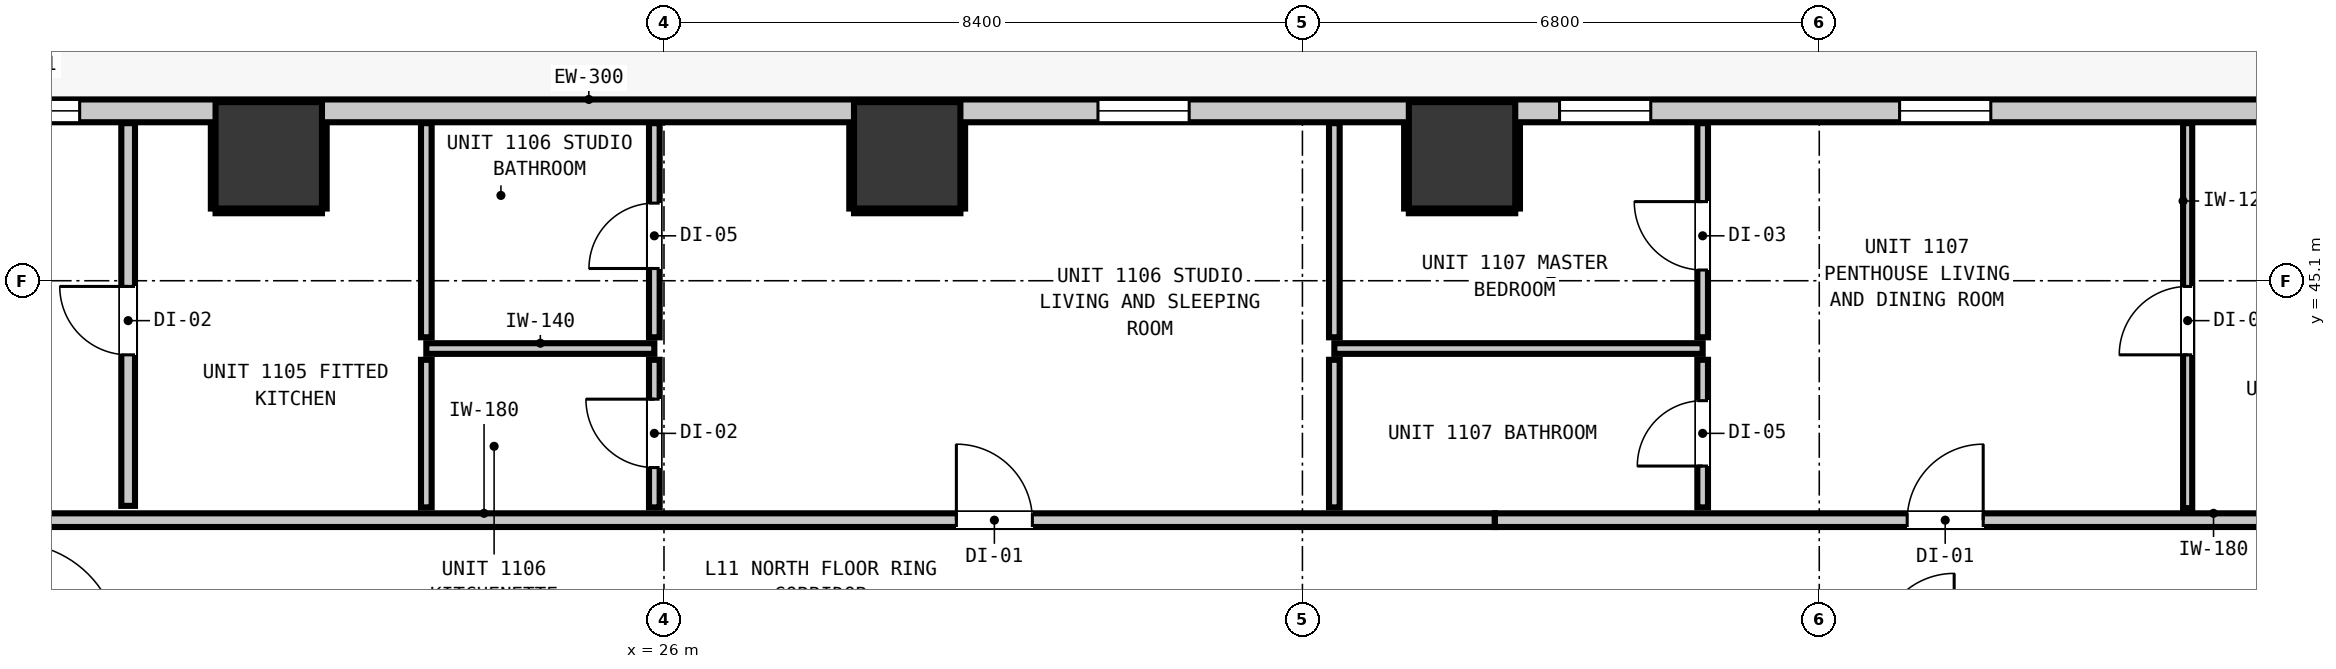
"""IFC4 building model, lengths in metres.
Left out: names, types, materials, properties, quantities, classifications, styles, units other than length and angle.
Written with IfcOpenShell. Run it as: python <this file> out.ifc"""

import sys

from ifc_helpers import new_model, si_unit, direction, frame, frame_2d, origin, origin_2d, place, context, subcontext, project, spatial, rectangle, extrude, element, fill, save


model = new_model("IFC4")
c1 = context("Model", 3, precision=1e-05, world=origin(), true_north=direction((0.0, 1.0)))
c2 = subcontext(c1, "Body", "Model", "MODEL_VIEW")
j1 = project(units=[si_unit("LENGTHUNIT", "METRE"), si_unit("PLANEANGLEUNIT", "RADIAN")], contexts=[c1])
p1 = place(None, origin())
s1 = spatial("IfcSite", under=j1, at=p1, CompositionType="ELEMENT")
p2 = place(p1, origin())
s2 = spatial("IfcBuilding", under=s1, at=p2, CompositionType="ELEMENT")
p3 = place(p2, frame((0.0, 0.0, 41.92)))
s3 = spatial("IfcBuildingStorey", under=s2, at=p3, CompositionType="ELEMENT", Elevation=41.92)
for number, where, z_axis, x_axis in (
    (1, (20.8, 46.75, -0.2), (0.0, 0.0, 1.0), (1.0, 0.0, 0.0)),
    (2, (29.2, 46.75, -0.2), (0.0, 0.0, 1.0), (1.0, 0.0, 0.0)),
    (3, (36.5, 46.75, -0.2), (0.0, 0.0, 1.0), (1.0, 0.0, 0.0)),
):
    element("IfcColumn", number, at=place(p3, frame(where, z_axis=z_axis, x_axis=x_axis)), inside=s3, PredefinedType="COLUMN", context=c2, shape_type="SweptSolid", body=[
        extrude(rectangle(XDim=1.4, YDim=1.4, at=origin_2d()), origin(), (0.0, 0.0, 1.0), 3.52),
    ])
p4 = place(p3, frame((10.365, 47.335, 0.0), z_axis=(0.0, 0.0, 1.0), x_axis=(1.0, 0.0, 0.0)))
e4 = element("IfcWall", 4, at=p4, inside=s3, PredefinedType="STANDARD", context=c2, shape_type="SweptSolid", body=[
    extrude(rectangle(XDim=37.47, YDim=0.3, at=frame_2d((18.735, 0.0))), origin(), (0.0, 0.0, 1.0), 3.06),
])
p5 = place(p4, frame((5.103, 0.0, 0.0)))
e5 = element("IfcOpeningElement", 5, at=p5, cuts=e4, PredefinedType="OPENING", context=c2, shape_type="SweptSolid", body=[
    extrude(rectangle(XDim=1.0, YDim=2.15, at=frame_2d((0.5, 1.075))), frame((0.0, 0.16, 0.0), z_axis=(0.0, -1.0, 0.0), x_axis=(1.0, 0.0, 0.0)), (0.0, 0.0, 1.0), 0.32),
])
p6 = place(p4, frame((6.747, 0.0, 0.85)))
e6 = element("IfcOpeningElement", 6, at=p6, cuts=e4, PredefinedType="OPENING", context=c2, shape_type="SweptSolid", body=[
    extrude(rectangle(XDim=1.2, YDim=1.8, at=frame_2d((0.6, 0.9))), frame((0.0, 0.16, 0.0), z_axis=(0.0, -1.0, 0.0), x_axis=(1.0, 0.0, 0.0)), (0.0, 0.0, 1.0), 0.32),
])
p7 = place(p4, frame((0.612, 0.0, 0.85)))
e7 = element("IfcOpeningElement", 7, at=p7, cuts=e4, PredefinedType="OPENING", context=c2, shape_type="SweptSolid", body=[
    extrude(rectangle(XDim=1.2, YDim=1.8, at=frame_2d((0.6, 0.9))), frame((0.0, 0.16, 0.0), z_axis=(0.0, -1.0, 0.0), x_axis=(1.0, 0.0, 0.0)), (0.0, 0.0, 1.0), 0.32),
])
p8 = place(p4, frame((21.345, 0.0, 0.85)))
e8 = element("IfcOpeningElement", 8, at=p8, cuts=e4, PredefinedType="OPENING", context=c2, shape_type="SweptSolid", body=[
    extrude(rectangle(XDim=1.2, YDim=1.8, at=frame_2d((0.6, 0.9))), frame((0.0, 0.16, 0.0), z_axis=(0.0, -1.0, 0.0), x_axis=(1.0, 0.0, 0.0)), (0.0, 0.0, 1.0), 0.32),
])
p9 = place(p4, frame((31.892, 0.0, 0.85)))
e9 = element("IfcOpeningElement", 9, at=p9, cuts=e4, PredefinedType="OPENING", context=c2, shape_type="SweptSolid", body=[
    extrude(rectangle(XDim=1.2, YDim=1.8, at=frame_2d((0.6, 0.9))), frame((0.0, 0.16, 0.0), z_axis=(0.0, -1.0, 0.0), x_axis=(1.0, 0.0, 0.0)), (0.0, 0.0, 1.0), 0.32),
])
p10 = place(p4, frame((27.418, 0.0, 0.85)))
e10 = element("IfcOpeningElement", 10, at=p10, cuts=e4, PredefinedType="OPENING", context=c2, shape_type="SweptSolid", body=[
    extrude(rectangle(XDim=1.2, YDim=1.8, at=frame_2d((0.6, 0.9))), frame((0.0, 0.16, 0.0), z_axis=(0.0, -1.0, 0.0), x_axis=(1.0, 0.0, 0.0)), (0.0, 0.0, 1.0), 0.32),
])
p11 = place(p3, frame((8.027, 41.95, 0.0), z_axis=(0.0, 0.0, 1.0), x_axis=(1.0, 0.0, 0.0)))
e11 = element("IfcWall", 11, at=p11, inside=s3, PredefinedType="PARTITIONING", context=c2, shape_type="SweptSolid", body=[
    extrude(rectangle(XDim=28.905, YDim=0.18, at=frame_2d((14.452, 0.0))), origin(), (0.0, 0.0, 1.0), 3.06),
])
p12 = place(p11, frame((8.391, 0.0, 0.0)))
e12 = element("IfcOpeningElement", 12, at=p12, cuts=e11, PredefinedType="OPENING", context=c2, shape_type="SweptSolid", body=[
    extrude(rectangle(XDim=1.0, YDim=2.15, at=frame_2d((0.5, 1.075))), frame((0.0, 0.1, 0.0), z_axis=(0.0, -1.0, 0.0), x_axis=(1.0, 0.0, 0.0)), (0.0, 0.0, 1.0), 0.2),
])
p13 = place(p11, frame((21.82, 0.0, 0.0)))
e13 = element("IfcOpeningElement", 13, at=p13, cuts=e11, PredefinedType="OPENING", context=c2, shape_type="SweptSolid", body=[
    extrude(rectangle(XDim=1.0, YDim=2.15, at=frame_2d((0.5, 1.075))), frame((0.0, 0.1, 0.0), z_axis=(0.0, -1.0, 0.0), x_axis=(1.0, 0.0, 0.0)), (0.0, 0.0, 1.0), 0.2),
])
p14 = place(p3, frame((36.932, 41.95, 0.0), z_axis=(0.0, 0.0, 1.0), x_axis=(1.0, 0.0, 0.0)))
e14 = element("IfcWall", 14, at=p14, inside=s3, PredefinedType="PARTITIONING", context=c2, shape_type="SweptSolid", body=[
    extrude(rectangle(XDim=12.386, YDim=0.18, at=frame_2d((6.193, 0.0))), origin(), (0.0, 0.0, 1.0), 2.445),
])
p15 = place(p14, frame((5.425, 0.0, 0.0)))
e15 = element("IfcOpeningElement", 15, at=p15, cuts=e14, PredefinedType="OPENING", context=c2, shape_type="SweptSolid", body=[
    extrude(rectangle(XDim=1.0, YDim=2.15, at=frame_2d((0.5, 1.075))), frame((0.0, 0.1, 0.0), z_axis=(0.0, -1.0, 0.0), x_axis=(1.0, 0.0, 0.0)), (0.0, 0.0, 1.0), 0.2),
])
p16 = place(p3, frame((22.873, 44.208, 0.0), z_axis=(0.0, 0.0, 1.0), x_axis=(1.0, 0.0, 0.0)))
e16 = element("IfcWall", 16, at=p16, inside=s3, PredefinedType="PARTITIONING", context=c2, shape_type="SweptSolid", body=[
    extrude(rectangle(XDim=3.0, YDim=0.14, at=frame_2d((1.5, 0.0))), origin(), (0.0, 0.0, 1.0), 3.06),
])
p17 = place(p3, frame((34.82, 44.208, 0.0), z_axis=(0.0, 0.0, 1.0), x_axis=(1.0, 0.0, 0.0)))
e17 = element("IfcWall", 17, at=p17, inside=s3, PredefinedType="PARTITIONING", context=c2, shape_type="SweptSolid", body=[
    extrude(rectangle(XDim=4.846, YDim=0.14, at=frame_2d((2.423, 0.0))), origin(), (0.0, 0.0, 1.0), 3.06),
])
p18 = place(p3, frame((18.95, 42.138, 0.0), z_axis=(0.0, 0.0, 1.0), x_axis=(0.0, 1.0, 0.0)))
e18 = element("IfcWall", 18, at=p18, inside=s3, PredefinedType="PARTITIONING", context=c2, shape_type="SweptSolid", body=[
    extrude(rectangle(XDim=5.035, YDim=0.18, at=frame_2d((2.518, 0.0))), origin(), (0.0, 0.0, 1.0), 3.06),
])
p19 = place(p18, frame((1.987, 0.0, 0.0)))
e19 = element("IfcOpeningElement", 19, at=p19, cuts=e18, PredefinedType="OPENING", context=c2, shape_type="SweptSolid", body=[
    extrude(rectangle(XDim=0.9, YDim=2.1, at=frame_2d((0.45, 1.05))), frame((0.0, 0.1, 0.0), z_axis=(0.0, -1.0, 0.0), x_axis=(1.0, 0.0, 0.0)), (0.0, 0.0, 1.0), 0.2),
])
p20 = place(p3, frame((22.873, 42.118, 0.0), z_axis=(0.0, 0.0, 1.0), x_axis=(0.0, 1.0, 0.0)))
e20 = element("IfcWall", 20, at=p20, inside=s3, PredefinedType="PARTITIONING", context=c2, shape_type="SweptSolid", body=[
    extrude(rectangle(XDim=1.942, YDim=0.14, at=frame_2d((0.971, 0.0))), origin(), (0.0, 0.0, 1.0), 3.06),
])
p21 = place(p3, frame((22.873, 44.356, 0.0), z_axis=(0.0, 0.0, 1.0), x_axis=(0.0, 1.0, 0.0)))
e21 = element("IfcWall", 21, at=p21, inside=s3, PredefinedType="PARTITIONING", context=c2, shape_type="SweptSolid", body=[
    extrude(rectangle(XDim=2.817, YDim=0.14, at=frame_2d((1.409, 0.0))), origin(), (0.0, 0.0, 1.0), 3.06),
])
p22 = place(p3, frame((25.873, 42.118, 0.0), z_axis=(0.0, 0.0, 1.0), x_axis=(0.0, 1.0, 0.0)))
e22 = element("IfcWall", 22, at=p22, inside=s3, PredefinedType="PARTITIONING", context=c2, shape_type="SweptSolid", body=[
    extrude(rectangle(XDim=1.942, YDim=0.14, at=frame_2d((0.971, 0.0))), origin(), (0.0, 0.0, 1.0), 3.06),
])
p23 = place(p22, frame((0.524, 0.0, 0.0)))
e23 = element("IfcOpeningElement", 23, at=p23, cuts=e22, PredefinedType="OPENING", context=c2, shape_type="SweptSolid", body=[
    extrude(rectangle(XDim=0.9, YDim=2.1, at=frame_2d((0.45, 1.05))), frame((0.0, 0.08, 0.0), z_axis=(0.0, -1.0, 0.0), x_axis=(1.0, 0.0, 0.0)), (0.0, 0.0, 1.0), 0.16),
])
p24 = place(p3, frame((25.873, 44.356, 0.0), z_axis=(0.0, 0.0, 1.0), x_axis=(0.0, 1.0, 0.0)))
e24 = element("IfcWall", 24, at=p24, inside=s3, PredefinedType="PARTITIONING", context=c2, shape_type="SweptSolid", body=[
    extrude(rectangle(XDim=2.817, YDim=0.14, at=frame_2d((1.409, 0.0))), origin(), (0.0, 0.0, 1.0), 3.06),
])
p25 = place(p24, frame((0.905, 0.0, 0.0)))
e25 = element("IfcOpeningElement", 25, at=p25, cuts=e24, PredefinedType="OPENING", context=c2, shape_type="SweptSolid", body=[
    extrude(rectangle(XDim=0.86, YDim=2.02, at=frame_2d((0.43, 1.01))), frame((0.0, 0.08, 0.0), z_axis=(0.0, -1.0, 0.0), x_axis=(1.0, 0.0, 0.0)), (0.0, 0.0, 1.0), 0.16),
])
p26 = place(p3, frame((34.82, 42.118, 0.0), z_axis=(0.0, 0.0, 1.0), x_axis=(0.0, 1.0, 0.0)))
e26 = element("IfcWall", 26, at=p26, inside=s3, PredefinedType="PARTITIONING", context=c2, shape_type="SweptSolid", body=[
    extrude(rectangle(XDim=1.942, YDim=0.14, at=frame_2d((0.971, 0.0))), origin(), (0.0, 0.0, 1.0), 3.06),
])
p27 = place(p3, frame((34.82, 44.356, 0.0), z_axis=(0.0, 0.0, 1.0), x_axis=(0.0, 1.0, 0.0)))
e27 = element("IfcWall", 27, at=p27, inside=s3, PredefinedType="PARTITIONING", context=c2, shape_type="SweptSolid", body=[
    extrude(rectangle(XDim=2.817, YDim=0.14, at=frame_2d((1.409, 0.0))), origin(), (0.0, 0.0, 1.0), 3.06),
])
p28 = place(p3, frame((39.666, 42.118, 0.0), z_axis=(0.0, 0.0, 1.0), x_axis=(0.0, 1.0, 0.0)))
e28 = element("IfcWall", 28, at=p28, inside=s3, PredefinedType="PARTITIONING", context=c2, shape_type="SweptSolid", body=[
    extrude(rectangle(XDim=1.942, YDim=0.14, at=frame_2d((0.971, 0.0))), origin(), (0.0, 0.0, 1.0), 3.06),
])
p29 = place(p28, frame((0.544, 0.0, 0.0)))
e29 = element("IfcOpeningElement", 29, at=p29, cuts=e28, PredefinedType="OPENING", context=c2, shape_type="SweptSolid", body=[
    extrude(rectangle(XDim=0.86, YDim=2.02, at=frame_2d((0.43, 1.01))), frame((0.0, 0.08, 0.0), z_axis=(0.0, -1.0, 0.0), x_axis=(1.0, 0.0, 0.0)), (0.0, 0.0, 1.0), 0.16),
])
p30 = place(p3, frame((39.666, 44.356, 0.0), z_axis=(0.0, 0.0, 1.0), x_axis=(0.0, 1.0, 0.0)))
e30 = element("IfcWall", 30, at=p30, inside=s3, PredefinedType="PARTITIONING", context=c2, shape_type="SweptSolid", body=[
    extrude(rectangle(XDim=2.817, YDim=0.14, at=frame_2d((1.409, 0.0))), origin(), (0.0, 0.0, 1.0), 3.06),
])
p31 = place(p30, frame((0.885, 0.0, 0.0)))
e31 = element("IfcOpeningElement", 31, at=p31, cuts=e30, PredefinedType="OPENING", context=c2, shape_type="SweptSolid", body=[
    extrude(rectangle(XDim=0.9, YDim=2.1, at=frame_2d((0.45, 1.05))), frame((0.0, 0.08, 0.0), z_axis=(0.0, -1.0, 0.0), x_axis=(1.0, 0.0, 0.0)), (0.0, 0.0, 1.0), 0.16),
])
p32 = place(p3, frame((46.047, 42.108, 0.0), z_axis=(0.0, 0.0, 1.0), x_axis=(0.0, 1.0, 0.0)))
e32 = element("IfcWall", 32, at=p32, inside=s3, PredefinedType="PARTITIONING", context=c2, shape_type="SweptSolid", body=[
    extrude(rectangle(XDim=5.065, YDim=0.12, at=frame_2d((2.533, 0.0))), origin(), (0.0, 0.0, 1.0), 3.06),
])
p33 = place(p32, frame((2.017, 0.0, 0.0)))
e33 = element("IfcOpeningElement", 33, at=p33, cuts=e32, PredefinedType="OPENING", context=c2, shape_type="SweptSolid", body=[
    extrude(rectangle(XDim=0.9, YDim=2.1, at=frame_2d((0.45, 1.05))), frame((0.0, 0.07, 0.0), z_axis=(0.0, -1.0, 0.0), x_axis=(1.0, 0.0, 0.0)), (0.0, 0.0, 1.0), 0.14),
])
p34 = place(p3, frame((20.1, 46.018, 0.0), z_axis=(0.0, 0.0, 1.0), x_axis=(1.0, 0.0, 0.0)))
e34 = element("IfcWall", 34, at=p34, inside=s3, PredefinedType="PARTITIONING", context=c2, shape_type="SweptSolid", body=[
    extrude(rectangle(XDim=1.4, YDim=0.06, at=frame_2d((0.7, 0.0))), origin(), (0.0, 0.0, 1.0), 1.45),
])
for number, where, z_axis, x_axis in (
    (35, (20.068, 46.05, 0.0), (0.0, 0.0, 1.0), (0.0, 1.0, 0.0)),
    (36, (21.532, 46.05, 0.0), (0.0, 0.0, 1.0), (0.0, 1.0, 0.0)),
):
    element("IfcWall", number, at=place(p3, frame(where, z_axis=z_axis, x_axis=x_axis)), inside=s3, PredefinedType="PARTITIONING", context=c2, shape_type="SweptSolid", body=[
        extrude(rectangle(XDim=1.12, YDim=0.06, at=frame_2d((0.56, 0.0))), origin(), (0.0, 0.0, 1.0), 1.45),
    ])
p35 = place(p3, frame((28.5, 46.018, 0.0), z_axis=(0.0, 0.0, 1.0), x_axis=(1.0, 0.0, 0.0)))
e37 = element("IfcWall", 37, at=p35, inside=s3, PredefinedType="PARTITIONING", context=c2, shape_type="SweptSolid", body=[
    extrude(rectangle(XDim=1.4, YDim=0.06, at=frame_2d((0.7, 0.0))), origin(), (0.0, 0.0, 1.0), 1.45),
])
for number, where, z_axis, x_axis in (
    (38, (28.468, 46.05, 0.0), (0.0, 0.0, 1.0), (0.0, 1.0, 0.0)),
    (39, (29.932, 46.05, 0.0), (0.0, 0.0, 1.0), (0.0, 1.0, 0.0)),
):
    element("IfcWall", number, at=place(p3, frame(where, z_axis=z_axis, x_axis=x_axis)), inside=s3, PredefinedType="PARTITIONING", context=c2, shape_type="SweptSolid", body=[
        extrude(rectangle(XDim=1.12, YDim=0.06, at=frame_2d((0.56, 0.0))), origin(), (0.0, 0.0, 1.0), 1.45),
    ])
p36 = place(p3, frame((35.8, 46.018, 0.0), z_axis=(0.0, 0.0, 1.0), x_axis=(1.0, 0.0, 0.0)))
e40 = element("IfcWall", 40, at=p36, inside=s3, PredefinedType="PARTITIONING", context=c2, shape_type="SweptSolid", body=[
    extrude(rectangle(XDim=1.4, YDim=0.06, at=frame_2d((0.7, 0.0))), origin(), (0.0, 0.0, 1.0), 1.45),
])
for number, where, z_axis, x_axis in (
    (41, (35.768, 46.05, 0.0), (0.0, 0.0, 1.0), (0.0, 1.0, 0.0)),
    (42, (37.232, 46.05, 0.0), (0.0, 0.0, 1.0), (0.0, 1.0, 0.0)),
):
    element("IfcWall", number, at=place(p3, frame(where, z_axis=z_axis, x_axis=x_axis)), inside=s3, PredefinedType="PARTITIONING", context=c2, shape_type="SweptSolid", body=[
        extrude(rectangle(XDim=1.12, YDim=0.06, at=frame_2d((0.56, 0.0))), origin(), (0.0, 0.0, 1.0), 1.45),
    ])
p37 = place(p6, origin())
e43 = element("IfcWindow", 43, at=p37, inside=s3, PartitioningType="SINGLE_PANEL", PredefinedType="WINDOW", context=c2, shape_type="SweptSolid", body=[
    extrude(rectangle(XDim=1.2, YDim=1.8, at=frame_2d((0.6, 0.9))), frame((0.0, 0.03, 0.0), z_axis=(0.0, -1.0, 0.0), x_axis=(1.0, 0.0, 0.0)), (0.0, 0.0, 1.0), 0.06),
])
fill(e6, e43)
p38 = place(p8, origin())
e44 = element("IfcWindow", 44, at=p38, inside=s3, PartitioningType="SINGLE_PANEL", PredefinedType="WINDOW", context=c2, shape_type="SweptSolid", body=[
    extrude(rectangle(XDim=1.2, YDim=1.8, at=frame_2d((0.6, 0.9))), frame((0.0, 0.03, 0.0), z_axis=(0.0, -1.0, 0.0), x_axis=(1.0, 0.0, 0.0)), (0.0, 0.0, 1.0), 0.06),
])
fill(e8, e44)
p39 = place(p9, origin())
e45 = element("IfcWindow", 45, at=p39, inside=s3, PartitioningType="SINGLE_PANEL", PredefinedType="WINDOW", context=c2, shape_type="SweptSolid", body=[
    extrude(rectangle(XDim=1.2, YDim=1.8, at=frame_2d((0.6, 0.9))), frame((0.0, 0.03, 0.0), z_axis=(0.0, -1.0, 0.0), x_axis=(1.0, 0.0, 0.0)), (0.0, 0.0, 1.0), 0.06),
])
fill(e9, e45)
p40 = place(p10, origin())
e46 = element("IfcWindow", 46, at=p40, inside=s3, PartitioningType="SINGLE_PANEL", PredefinedType="WINDOW", context=c2, shape_type="SweptSolid", body=[
    extrude(rectangle(XDim=1.2, YDim=1.8, at=frame_2d((0.6, 0.9))), frame((0.0, 0.03, 0.0), z_axis=(0.0, -1.0, 0.0), x_axis=(1.0, 0.0, 0.0)), (0.0, 0.0, 1.0), 0.06),
])
fill(e10, e46)
p41 = place(p19, origin())
e47 = element("IfcDoor", 47, at=p41, inside=s3, OperationType="SINGLE_SWING_RIGHT", PredefinedType="DOOR", context=c2, shape_type="SweptSolid", body=[
    extrude(rectangle(XDim=0.9, YDim=2.1, at=frame_2d((0.45, 1.05))), frame((0.0, 0.025, 0.0), z_axis=(0.0, -1.0, 0.0), x_axis=(1.0, 0.0, 0.0)), (0.0, 0.0, 1.0), 0.05),
])
fill(e19, e47)
p42 = place(p13, origin())
e48 = element("IfcDoor", 48, at=p42, inside=s3, OperationType="SINGLE_SWING_LEFT", PredefinedType="DOOR", context=c2, shape_type="SweptSolid", body=[
    extrude(rectangle(XDim=1.0, YDim=2.15, at=frame_2d((0.5, 1.075))), frame((0.0, 0.025, 0.0), z_axis=(0.0, -1.0, 0.0), x_axis=(1.0, 0.0, 0.0)), (0.0, 0.0, 1.0), 0.05),
])
fill(e13, e48)
p43 = place(p23, origin())
e49 = element("IfcDoor", 49, at=p43, inside=s3, OperationType="SINGLE_SWING_RIGHT", PredefinedType="DOOR", context=c2, shape_type="SweptSolid", body=[
    extrude(rectangle(XDim=0.9, YDim=2.1, at=frame_2d((0.45, 1.05))), frame((0.0, 0.025, 0.0), z_axis=(0.0, -1.0, 0.0), x_axis=(1.0, 0.0, 0.0)), (0.0, 0.0, 1.0), 0.05),
])
fill(e23, e49)
p44 = place(p25, origin())
e50 = element("IfcDoor", 50, at=p44, inside=s3, OperationType="SINGLE_SWING_LEFT", PredefinedType="DOOR", context=c2, shape_type="SweptSolid", body=[
    extrude(rectangle(XDim=0.86, YDim=2.02, at=frame_2d((0.43, 1.01))), frame((0.0, 0.025, 0.0), z_axis=(0.0, -1.0, 0.0), x_axis=(1.0, 0.0, 0.0)), (0.0, 0.0, 1.0), 0.05),
])
fill(e25, e50)
p45 = place(p15, origin())
e51 = element("IfcDoor", 51, at=p45, inside=s3, OperationType="SINGLE_SWING_RIGHT", PredefinedType="DOOR", context=c2, shape_type="SweptSolid", body=[
    extrude(rectangle(XDim=1.0, YDim=2.15, at=frame_2d((0.5, 1.075))), frame((0.0, 0.025, 0.0), z_axis=(0.0, -1.0, 0.0), x_axis=(1.0, 0.0, 0.0)), (0.0, 0.0, 1.0), 0.05),
])
fill(e15, e51)
p46 = place(p29, origin())
e52 = element("IfcDoor", 52, at=p46, inside=s3, OperationType="SINGLE_SWING_LEFT", PredefinedType="DOOR", context=c2, shape_type="SweptSolid", body=[
    extrude(rectangle(XDim=0.86, YDim=2.02, at=frame_2d((0.43, 1.01))), frame((0.0, 0.025, 0.0), z_axis=(0.0, -1.0, 0.0), x_axis=(1.0, 0.0, 0.0)), (0.0, 0.0, 1.0), 0.05),
])
fill(e29, e52)
p47 = place(p31, origin())
e53 = element("IfcDoor", 53, at=p47, inside=s3, OperationType="SINGLE_SWING_RIGHT", PredefinedType="DOOR", context=c2, shape_type="SweptSolid", body=[
    extrude(rectangle(XDim=0.9, YDim=2.1, at=frame_2d((0.45, 1.05))), frame((0.0, 0.025, 0.0), z_axis=(0.0, -1.0, 0.0), x_axis=(1.0, 0.0, 0.0)), (0.0, 0.0, 1.0), 0.05),
])
fill(e31, e53)
p48 = place(p33, origin())
e54 = element("IfcDoor", 54, at=p48, inside=s3, OperationType="SINGLE_SWING_LEFT", PredefinedType="DOOR", context=c2, shape_type="SweptSolid", body=[
    extrude(rectangle(XDim=0.9, YDim=2.1, at=frame_2d((0.45, 1.05))), frame((0.0, 0.025, 0.0), z_axis=(0.0, -1.0, 0.0), x_axis=(1.0, 0.0, 0.0)), (0.0, 0.0, 1.0), 0.05),
])
fill(e33, e54)
save(model, sys.argv[1])
